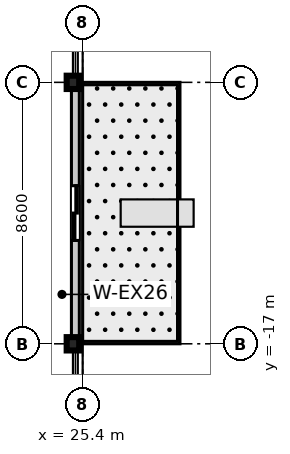
"""IFC4 building model, lengths in metres.
Left out: names, types, materials, properties, quantities, classifications, styles, units other than length and angle.
Written with IfcOpenShell. Run it as: python <this file> out.ifc"""

import sys

from ifc_helpers import new_model, si_unit, direction, frame, frame_2d, origin, origin_2d, place, context, subcontext, project, spatial, rectangle, i_section, extrude, source, transform, mapped, element, fill, save


model = new_model("IFC4")
c1 = context("Model", 3, precision=1e-05, world=origin(), true_north=direction((0.0, 1.0)))
c2 = subcontext(c1, "Body", "Model", "MODEL_VIEW")
j1 = project(units=[si_unit("LENGTHUNIT", "METRE"), si_unit("PLANEANGLEUNIT", "RADIAN")], contexts=[c1])
p1 = place(None, origin())
s1 = spatial("IfcSite", under=j1, at=p1, CompositionType="ELEMENT")
p2 = place(p1, origin())
s2 = spatial("IfcBuilding", under=s1, at=p2, CompositionType="ELEMENT")
p3 = place(p2, frame((0.0, 0.0, 39.7)))
s3 = spatial("IfcBuildingStorey", under=s2, at=p3, CompositionType="ELEMENT", Elevation=39.7)
m1 = source(origin(), c2, "Body", "SweptSolid", [
    extrude(i_section(OverallWidth=0.412, OverallDepth=0.438, WebThickness=0.023, FlangeThickness=0.036, at=origin_2d()), origin(), (0.0, 0.0, 1.0), 3.605),
])
for number, where, z_axis, x_axis in (
    (1, (25.08, -17.0, 0.0), (0.0, 0.0, 1.0), (1.0, 0.0, 0.0)),
    (2, (25.08, -8.4, 0.0), (0.0, 0.0, 1.0), (1.0, 0.0, 0.0)),
):
    element("IfcColumn", number, at=place(p3, frame(where, z_axis=z_axis, x_axis=x_axis)), inside=s3, PredefinedType="COLUMN", context=c2, shape_type="MappedRepresentation", body=[
        mapped(m1, transform((0.0, 0.0, 0.0), scale=1.0)),
    ])
m2 = source(origin(), c2, "Body", "SweptSolid", [
    extrude(rectangle(XDim=8.6, YDim=0.26, at=frame_2d((4.3, 0.0))), origin(), (0.0, 0.0, 1.0), 2.85),
])
p4 = place(p3, frame((25.16, -17.0, 0.0), z_axis=(0.0, 0.0, 1.0), x_axis=(0.0, 1.0, 0.0)))
e3 = element("IfcWall", 3, at=p4, inside=s3, PredefinedType="STANDARD", context=c2, shape_type="MappedRepresentation", body=[
    mapped(m2, transform((0.0, 0.0, 0.0), scale=1.0)),
])
p5 = place(p4, frame((3.4, 0.0, 0.0)))
e4 = element("IfcOpeningElement", 4, at=p5, cuts=e3, PredefinedType="OPENING", context=c2, shape_type="SweptSolid", body=[
    extrude(rectangle(XDim=1.8, YDim=2.25, at=frame_2d((0.9, 1.125))), frame((0.0, 0.14, 0.0), z_axis=(0.0, -1.0, 0.0), x_axis=(1.0, 0.0, 0.0)), (0.0, 0.0, 1.0), 0.28),
])
m3 = source(origin(), c2, "Body", "SweptSolid", [
    extrude(rectangle(XDim=1.8, YDim=2.25, at=frame_2d((0.9, 1.125))), frame((0.0, 0.025, 0.0), z_axis=(0.0, -1.0, 0.0), x_axis=(1.0, 0.0, 0.0)), (0.0, 0.0, 1.0), 0.05),
])
p6 = place(p5, frame((1.8, 0.0, 0.0), z_axis=(0.0, 0.0, 1.0), x_axis=(-1.0, 0.0, 0.0)))
e5 = element("IfcDoor", 5, at=p6, inside=s3, OperationType="DOUBLE_DOOR_SLIDING", PredefinedType="DOOR", context=c2, shape_type="MappedRepresentation", body=[
    mapped(m3, transform((0.0, 0.0, 0.0), scale=1.0)),
])
fill(e4, e5)
save(model, sys.argv[1])
